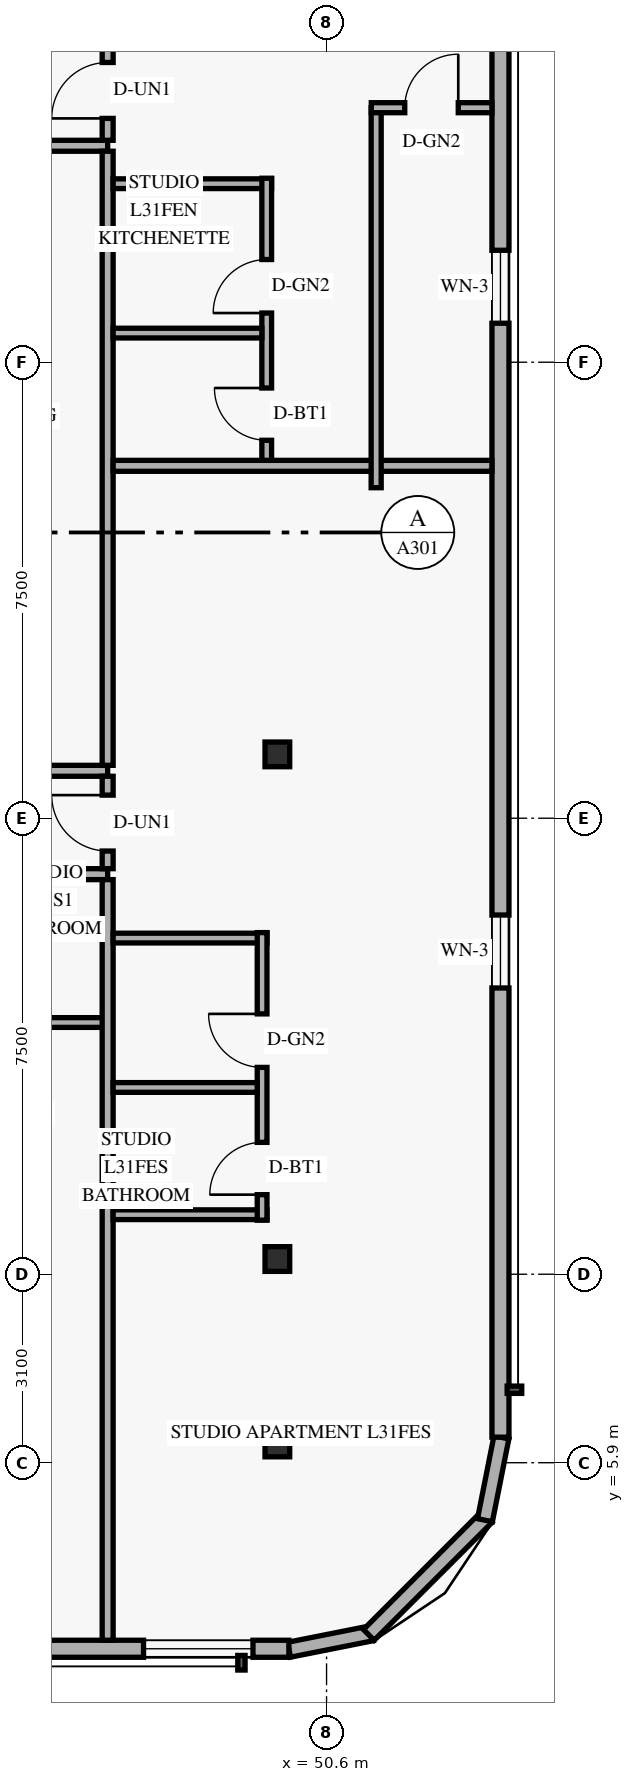
"""IFC4 building model, lengths in metres.
Left out: names, types, materials, properties, quantities, classifications, styles, units other than length and angle.
Written with IfcOpenShell. Run it as: python <this file> out.ifc"""

import sys

from ifc_helpers import new_model, si_unit, direction, frame, frame_2d, origin, origin_2d, place, context, subcontext, project, spatial, rectangle, hollow_rectangle, extrude, element, fill, save


model = new_model("IFC4")
c1 = context("Model", 3, precision=1e-05, world=origin(), true_north=direction((0.0, 1.0)))
c2 = subcontext(c1, "Body", "Model", "MODEL_VIEW")
j1 = project(units=[si_unit("LENGTHUNIT", "METRE"), si_unit("PLANEANGLEUNIT", "RADIAN")], contexts=[c1])
p1 = place(None, origin())
s1 = spatial("IfcSite", under=j1, at=p1, CompositionType="ELEMENT")
p2 = place(p1, origin())
s2 = spatial("IfcBuilding", under=s1, at=p2, CompositionType="ELEMENT")
p3 = place(p2, frame((0.0, 0.0, 121.2)))
s3 = spatial("IfcBuildingStorey", under=s2, at=p3, CompositionType="ELEMENT", Elevation=121.2)
for number, where, z_axis, x_axis in (
    (1, (49.686, 6.2, 0.0), (0.058, 0.0, 0.998), (0.0, 1.0, 0.0)),
    (2, (49.686, 9.25, 0.0), (0.058, 0.0, 0.998), (0.0, 1.0, 0.0)),
    (3, (49.686, 17.55, 0.0), (0.058, 0.0, 0.998), (0.0, 1.0, 0.0)),
):
    element("IfcColumn", number, at=place(p3, frame(where, z_axis=z_axis, x_axis=x_axis)), inside=s3, PredefinedType="COLUMN", context=c2, shape_type="SweptSolid", body=[
        extrude(hollow_rectangle(XDim=0.406, YDim=0.406, WallThickness=0.016, at=origin_2d()), origin(), (0.0, 0.0, 1.0), 3.606),
    ])
p4 = place(p3, frame((49.983, 2.824, 0.0), z_axis=(0.0, 0.0, 1.0), x_axis=(0.980809899341, 0.19496651342, 0.0)))
e4 = element("IfcWall", 4, at=p4, inside=s3, PredefinedType="SOLIDWALL", context=c2, shape_type="SweptSolid", body=[
    extrude(rectangle(XDim=1.389, YDim=0.25, at=frame_2d((0.694, 0.0))), origin(), (0.0, 0.0, 1.0), 3.36),
])
p5 = place(p3, frame((51.295, 3.068, 0.0), z_axis=(0.0, 0.0, 1.0), x_axis=(0.707151344399, 0.707062215165, 0.0)))
e5 = element("IfcWall", 5, at=p5, inside=s3, PredefinedType="SOLIDWALL", context=c2, shape_type="SweptSolid", body=[
    extrude(rectangle(XDim=2.739, YDim=0.25, at=frame_2d((1.37, 0.0))), origin(), (0.0, 0.0, 1.0), 3.36),
])
p6 = place(p3, frame((53.205, 4.955, 0.0), z_axis=(0.0, 0.0, 1.0), x_axis=(0.195000137217, 0.980803214965, 0.0)))
e6 = element("IfcWall", 6, at=p6, inside=s3, PredefinedType="SOLIDWALL", context=c2, shape_type="SweptSolid", body=[
    extrude(rectangle(XDim=1.388, YDim=0.25, at=frame_2d((0.694, 0.0))), origin(), (0.0, 0.0, 1.0), 3.36),
])
p7 = place(p3, frame((13.42, 2.84, 0.0), z_axis=(0.0, 0.0, 1.0), x_axis=(1.0, 0.0, 0.0)))
e7 = element("IfcWall", 7, at=p7, inside=s3, PredefinedType="SOLIDWALL", context=c2, shape_type="SweptSolid", body=[
    extrude(rectangle(XDim=36.56, YDim=0.28, at=frame_2d((18.28, 0.0))), origin(), (0.0, 0.0, 1.0), 3.36),
])
p8 = place(p7, frame((3.215, 0.0, 0.85)))
e8 = element("IfcOpeningElement", 8, at=p8, cuts=e7, PredefinedType="OPENING", context=c2, shape_type="SweptSolid", body=[
    extrude(rectangle(XDim=1.8, YDim=1.6, at=frame_2d((0.9, 0.8))), frame((0.0, 0.15, 0.0), z_axis=(0.0, -1.0, 0.0), x_axis=(1.0, 0.0, 0.0)), (0.0, 0.0, 1.0), 0.3),
])
p9 = place(p7, frame((10.405, 0.0, 0.85)))
e9 = element("IfcOpeningElement", 9, at=p9, cuts=e7, PredefinedType="OPENING", context=c2, shape_type="SweptSolid", body=[
    extrude(rectangle(XDim=1.8, YDim=1.6, at=frame_2d((0.9, 0.8))), frame((0.0, 0.15, 0.0), z_axis=(0.0, -1.0, 0.0), x_axis=(1.0, 0.0, 0.0)), (0.0, 0.0, 1.0), 0.3),
])
p10 = place(p7, frame((17.29, 0.0, 0.85)))
e10 = element("IfcOpeningElement", 10, at=p10, cuts=e7, PredefinedType="OPENING", context=c2, shape_type="SweptSolid", body=[
    extrude(rectangle(XDim=1.8, YDim=1.6, at=frame_2d((0.9, 0.8))), frame((0.0, 0.15, 0.0), z_axis=(0.0, -1.0, 0.0), x_axis=(1.0, 0.0, 0.0)), (0.0, 0.0, 1.0), 0.3),
])
p11 = place(p7, frame((22.565, 0.0, 0.85)))
e11 = element("IfcOpeningElement", 11, at=p11, cuts=e7, PredefinedType="OPENING", context=c2, shape_type="SweptSolid", body=[
    extrude(rectangle(XDim=1.8, YDim=1.6, at=frame_2d((0.9, 0.8))), frame((0.0, 0.15, 0.0), z_axis=(0.0, -1.0, 0.0), x_axis=(1.0, 0.0, 0.0)), (0.0, 0.0, 1.0), 0.3),
])
p12 = place(p7, frame((28.355, 0.0, 0.85)))
e12 = element("IfcOpeningElement", 12, at=p12, cuts=e7, PredefinedType="OPENING", context=c2, shape_type="SweptSolid", body=[
    extrude(rectangle(XDim=1.8, YDim=1.6, at=frame_2d((0.9, 0.8))), frame((0.0, 0.15, 0.0), z_axis=(0.0, -1.0, 0.0), x_axis=(1.0, 0.0, 0.0)), (0.0, 0.0, 1.0), 0.3),
])
p13 = place(p7, frame((34.17, 0.0, 0.85)))
e13 = element("IfcOpeningElement", 13, at=p13, cuts=e7, PredefinedType="OPENING", context=c2, shape_type="SweptSolid", body=[
    extrude(rectangle(XDim=1.8, YDim=1.6, at=frame_2d((0.9, 0.8))), frame((0.0, 0.15, 0.0), z_axis=(0.0, -1.0, 0.0), x_axis=(1.0, 0.0, 0.0)), (0.0, 0.0, 1.0), 0.3),
])
p14 = place(p3, frame((53.46, 6.32, 0.0), z_axis=(0.0, 0.0, 1.0), x_axis=(0.0, 1.0, 0.0)))
e14 = element("IfcWall", 14, at=p14, inside=s3, PredefinedType="SOLIDWALL", context=c2, shape_type="SweptSolid", body=[
    extrude(rectangle(XDim=35.36, YDim=0.28, at=frame_2d((17.68, 0.0))), origin(), (0.0, 0.0, 1.0), 3.36),
])
p15 = place(p14, frame((7.388, 0.0, 0.85)))
e15 = element("IfcOpeningElement", 15, at=p15, cuts=e14, PredefinedType="OPENING", context=c2, shape_type="SweptSolid", body=[
    extrude(rectangle(XDim=1.2, YDim=1.5, at=frame_2d((0.6, 0.75))), frame((0.0, 0.15, 0.0), z_axis=(0.0, -1.0, 0.0), x_axis=(1.0, 0.0, 0.0)), (0.0, 0.0, 1.0), 0.3),
])
p16 = place(p14, frame((18.321, 0.0, 0.85)))
e16 = element("IfcOpeningElement", 16, at=p16, cuts=e14, PredefinedType="OPENING", context=c2, shape_type="SweptSolid", body=[
    extrude(rectangle(XDim=1.2, YDim=1.5, at=frame_2d((0.6, 0.75))), frame((0.0, 0.15, 0.0), z_axis=(0.0, -1.0, 0.0), x_axis=(1.0, 0.0, 0.0)), (0.0, 0.0, 1.0), 0.3),
])
p17 = place(p14, frame((28.013, 0.0, 0.85)))
e17 = element("IfcOpeningElement", 17, at=p17, cuts=e14, PredefinedType="OPENING", context=c2, shape_type="SweptSolid", body=[
    extrude(rectangle(XDim=1.2, YDim=1.5, at=frame_2d((0.6, 0.75))), frame((0.0, 0.15, 0.0), z_axis=(0.0, -1.0, 0.0), x_axis=(1.0, 0.0, 0.0)), (0.0, 0.0, 1.0), 0.3),
])
p18 = place(p3, frame((38.433, 15.58, 0.0), z_axis=(0.0, 0.0, 1.0), x_axis=(1.0, 0.0, 0.0)))
e18 = element("IfcWall", 18, at=p18, inside=s3, PredefinedType="STANDARD", context=c2, shape_type="SweptSolid", body=[
    extrude(rectangle(XDim=8.567, YDim=0.18, at=frame_2d((4.284, 0.0))), origin(), (0.0, 0.0, 1.0), 2.731),
])
p19 = place(p18, frame((0.357, 0.0, 0.0)))
e19 = element("IfcOpeningElement", 19, at=p19, cuts=e18, PredefinedType="OPENING", context=c2, shape_type="SweptSolid", body=[
    extrude(rectangle(XDim=0.92, YDim=2.15, at=frame_2d((0.46, 1.075))), frame((0.0, 0.1, 0.0), z_axis=(0.0, -1.0, 0.0), x_axis=(1.0, 0.0, 0.0)), (0.0, 0.0, 1.0), 0.2),
])
p20 = place(p3, frame((37.64, 17.28, 0.0), z_axis=(0.0, 0.0, 1.0), x_axis=(1.0, 0.0, 0.0)))
e20 = element("IfcWall", 20, at=p20, inside=s3, PredefinedType="STANDARD", context=c2, shape_type="SweptSolid", body=[
    extrude(rectangle(XDim=9.36, YDim=0.18, at=frame_2d((4.68, 0.0))), origin(), (0.0, 0.0, 1.0), 2.731),
])
p21 = place(p20, frame((7.238, 0.0, 0.0)))
e21 = element("IfcOpeningElement", 21, at=p21, cuts=e20, PredefinedType="OPENING", context=c2, shape_type="SweptSolid", body=[
    extrude(rectangle(XDim=0.92, YDim=2.15, at=frame_2d((0.46, 1.075))), frame((0.0, 0.1, 0.0), z_axis=(0.0, -1.0, 0.0), x_axis=(1.0, 0.0, 0.0)), (0.0, 0.0, 1.0), 0.2),
])
p22 = place(p3, frame((37.64, 27.56, 0.0), z_axis=(0.0, 0.0, 1.0), x_axis=(1.0, 0.0, 0.0)))
e22 = element("IfcWall", 22, at=p22, inside=s3, PredefinedType="STANDARD", context=c2, shape_type="SweptSolid", body=[
    extrude(rectangle(XDim=9.36, YDim=0.18, at=frame_2d((4.68, 0.0))), origin(), (0.0, 0.0, 1.0), 2.731),
])
p23 = place(p3, frame((42.33, 13.14, 0.0), z_axis=(0.0, 0.0, 1.0), x_axis=(1.0, 0.0, 0.0)))
e23 = element("IfcWall", 23, at=p23, inside=s3, PredefinedType="PLUMBINGWALL", context=c2, shape_type="SweptSolid", body=[
    extrude(rectangle(XDim=4.67, YDim=0.16, at=frame_2d((2.335, 0.0))), origin(), (0.0, 0.0, 1.0), 2.731),
])
p24 = place(p23, frame((0.35, 0.0, 0.0)))
e24 = element("IfcOpeningElement", 24, at=p24, cuts=e23, PredefinedType="OPENING", context=c2, shape_type="SweptSolid", body=[
    extrude(rectangle(XDim=0.88, YDim=2.12, at=frame_2d((0.44, 1.06))), frame((0.0, 0.09, 0.0), z_axis=(0.0, -1.0, 0.0), x_axis=(1.0, 0.0, 0.0)), (0.0, 0.0, 1.0), 0.18),
])
p25 = place(p23, frame((2.72, 0.0, 0.0)))
e25 = element("IfcOpeningElement", 25, at=p25, cuts=e23, PredefinedType="OPENING", context=c2, shape_type="SweptSolid", body=[
    extrude(rectangle(XDim=0.86, YDim=2.12, at=frame_2d((0.43, 1.06))), frame((0.0, 0.09, 0.0), z_axis=(0.0, -1.0, 0.0), x_axis=(1.0, 0.0, 0.0)), (0.0, 0.0, 1.0), 0.18),
])
p26 = place(p3, frame((47.0, 15.67, 0.0), z_axis=(0.0, 0.0, 1.0), x_axis=(0.0, 1.0, 0.0)))
e26 = element("IfcWall", 26, at=p26, inside=s3, PredefinedType="STANDARD", context=c2, shape_type="SweptSolid", body=[
    extrude(rectangle(XDim=1.52, YDim=0.18, at=frame_2d((0.76, 0.0))), origin(), (0.0, 0.0, 1.0), 3.36),
])
p27 = place(p26, frame((0.29, 0.0, 0.0)))
e27 = element("IfcOpeningElement", 27, at=p27, cuts=e26, PredefinedType="OPENING", context=c2, shape_type="SweptSolid", body=[
    extrude(rectangle(XDim=0.92, YDim=2.15, at=frame_2d((0.46, 1.075))), frame((0.0, 0.1, 0.0), z_axis=(0.0, -1.0, 0.0), x_axis=(1.0, 0.0, 0.0)), (0.0, 0.0, 1.0), 0.2),
])
p28 = place(p3, frame((47.0, 27.65, 0.0), z_axis=(0.0, 0.0, 1.0), x_axis=(0.0, 1.0, 0.0)))
e28 = element("IfcWall", 28, at=p28, inside=s3, PredefinedType="STANDARD", context=c2, shape_type="SweptSolid", body=[
    extrude(rectangle(XDim=1.72, YDim=0.18, at=frame_2d((0.86, 0.0))), origin(), (0.0, 0.0, 1.0), 3.36),
])
p29 = place(p28, frame((0.36, 0.0, 0.0)))
e29 = element("IfcOpeningElement", 29, at=p29, cuts=e28, PredefinedType="OPENING", context=c2, shape_type="SweptSolid", body=[
    extrude(rectangle(XDim=0.92, YDim=2.15, at=frame_2d((0.46, 1.075))), frame((0.0, 0.1, 0.0), z_axis=(0.0, -1.0, 0.0), x_axis=(1.0, 0.0, 0.0)), (0.0, 0.0, 1.0), 0.2),
])
p30 = place(p3, frame((47.0, 2.98, 0.0), z_axis=(0.0, 0.0, 1.0), x_axis=(0.0, 1.0, 0.0)))
e30 = element("IfcWall", 30, at=p30, inside=s3, PredefinedType="PARTITIONING", context=c2, shape_type="SweptSolid", body=[
    extrude(rectangle(XDim=12.51, YDim=0.18, at=frame_2d((6.255, 0.0))), origin(), (0.0, 0.0, 1.0), 2.731),
])
p31 = place(p3, frame((47.0, 17.37, 0.0), z_axis=(0.0, 0.0, 1.0), x_axis=(0.0, 1.0, 0.0)))
e31 = element("IfcWall", 31, at=p31, inside=s3, PredefinedType="PARTITIONING", context=c2, shape_type="SweptSolid", body=[
    extrude(rectangle(XDim=10.1, YDim=0.18, at=frame_2d((5.05, 0.0))), origin(), (0.0, 0.0, 1.0), 2.731),
])
p32 = place(p3, frame((47.09, 22.296, 0.0), z_axis=(0.0, 0.0, 1.0), x_axis=(1.0, 0.0, 0.0)))
e32 = element("IfcWall", 32, at=p32, inside=s3, PredefinedType="PARTITIONING", context=c2, shape_type="SweptSolid", body=[
    extrude(rectangle(XDim=6.23, YDim=0.18, at=frame_2d((3.115, 0.0))), origin(), (0.0, 0.0, 1.0), 2.809),
])
for number, where, z_axis, x_axis in (
    (33, (47.09, 9.979, 0.0), (0.0, 0.0, 1.0), (1.0, 0.0, 0.0)),
    (34, (47.09, 14.529, 0.0), (0.0, 0.0, 1.0), (1.0, 0.0, 0.0)),
):
    element("IfcWall", number, at=place(p3, frame(where, z_axis=z_axis, x_axis=x_axis)), inside=s3, PredefinedType="PLUMBINGWALL", context=c2, shape_type="SweptSolid", body=[
        extrude(rectangle(XDim=2.53, YDim=0.16, at=frame_2d((1.265, 0.0))), origin(), (0.0, 0.0, 1.0), 3.36),
    ])
p33 = place(p3, frame((49.54, 9.889, 0.0), z_axis=(0.0, 0.0, 1.0), x_axis=(0.0, 1.0, 0.0)))
e35 = element("IfcWall", 35, at=p33, inside=s3, PredefinedType="PLUMBINGWALL", context=c2, shape_type="SweptSolid", body=[
    extrude(rectangle(XDim=4.73, YDim=0.16, at=frame_2d((2.365, 0.0))), origin(), (0.0, 0.0, 1.0), 2.988),
])
p34 = place(p33, frame((0.42, 0.0, 0.0)))
e36 = element("IfcOpeningElement", 36, at=p34, cuts=e35, PredefinedType="OPENING", context=c2, shape_type="SweptSolid", body=[
    extrude(rectangle(XDim=0.86, YDim=2.12, at=frame_2d((0.43, 1.06))), frame((0.0, 0.09, 0.0), z_axis=(0.0, -1.0, 0.0), x_axis=(1.0, 0.0, 0.0)), (0.0, 0.0, 1.0), 0.18),
])
p35 = place(p33, frame((2.513, 0.0, 0.0)))
e37 = element("IfcOpeningElement", 37, at=p35, cuts=e35, PredefinedType="OPENING", context=c2, shape_type="SweptSolid", body=[
    extrude(rectangle(XDim=0.88, YDim=2.12, at=frame_2d((0.44, 1.06))), frame((0.0, 0.09, 0.0), z_axis=(0.0, -1.0, 0.0), x_axis=(1.0, 0.0, 0.0)), (0.0, 0.0, 1.0), 0.18),
])
p36 = place(p3, frame((47.09, 12.072, 0.0), z_axis=(0.0, 0.0, 1.0), x_axis=(1.0, 0.0, 0.0)))
e38 = element("IfcWall", 38, at=p36, inside=s3, PredefinedType="PLUMBINGWALL", context=c2, shape_type="SweptSolid", body=[
    extrude(rectangle(XDim=2.37, YDim=0.16, at=frame_2d((1.185, 0.0))), origin(), (0.0, 0.0, 1.0), 3.36),
])
p37 = place(p3, frame((47.09, 26.936, 0.0), z_axis=(0.0, 0.0, 1.0), x_axis=(1.0, 0.0, 0.0)))
e39 = element("IfcWall", 39, at=p37, inside=s3, PredefinedType="PLUMBINGWALL", context=c2, shape_type="SweptSolid", body=[
    extrude(rectangle(XDim=2.606, YDim=0.16, at=frame_2d((1.303, 0.0))), origin(), (0.0, 0.0, 1.0), 3.36),
])
p38 = place(p3, frame((49.616, 22.386, 0.0), z_axis=(0.0, 0.0, 1.0), x_axis=(0.0, 1.0, 0.0)))
e40 = element("IfcWall", 40, at=p38, inside=s3, PredefinedType="PLUMBINGWALL", context=c2, shape_type="SweptSolid", body=[
    extrude(rectangle(XDim=4.64, YDim=0.16, at=frame_2d((2.32, 0.0))), origin(), (0.0, 0.0, 1.0), 3.36),
])
p39 = place(p38, frame((0.33, 0.0, 0.0)))
e41 = element("IfcOpeningElement", 41, at=p39, cuts=e40, PredefinedType="OPENING", context=c2, shape_type="SweptSolid", body=[
    extrude(rectangle(XDim=0.86, YDim=2.12, at=frame_2d((0.43, 1.06))), frame((0.0, 0.09, 0.0), z_axis=(0.0, -1.0, 0.0), x_axis=(1.0, 0.0, 0.0)), (0.0, 0.0, 1.0), 0.18),
])
p40 = place(p38, frame((2.423, 0.0, 0.0)))
e42 = element("IfcOpeningElement", 42, at=p40, cuts=e40, PredefinedType="OPENING", context=c2, shape_type="SweptSolid", body=[
    extrude(rectangle(XDim=0.88, YDim=2.12, at=frame_2d((0.44, 1.06))), frame((0.0, 0.09, 0.0), z_axis=(0.0, -1.0, 0.0), x_axis=(1.0, 0.0, 0.0)), (0.0, 0.0, 1.0), 0.18),
])
p41 = place(p3, frame((47.09, 24.479, 0.0), z_axis=(0.0, 0.0, 1.0), x_axis=(1.0, 0.0, 0.0)))
e43 = element("IfcWall", 43, at=p41, inside=s3, PredefinedType="PLUMBINGWALL", context=c2, shape_type="SweptSolid", body=[
    extrude(rectangle(XDim=2.446, YDim=0.16, at=frame_2d((1.223, 0.0))), origin(), (0.0, 0.0, 1.0), 3.36),
])
p42 = place(p3, frame((51.416, 21.936, 0.0), z_axis=(0.0, 0.0, 1.0), x_axis=(0.0, 1.0, 0.0)))
e44 = element("IfcWall", 44, at=p42, inside=s3, PredefinedType="PARTITIONING", context=c2, shape_type="SweptSolid", body=[
    extrude(rectangle(XDim=6.25, YDim=0.165, at=frame_2d((3.125, 0.0))), origin(), (0.0, 0.0, 1.0), 3.36),
])
p43 = place(p3, frame((51.336, 28.186, 0.0), z_axis=(0.0, 0.0, 1.0), x_axis=(1.0, 0.0, 0.0)))
e45 = element("IfcWall", 45, at=p43, inside=s3, PredefinedType="PARTITIONING", context=c2, shape_type="SweptSolid", body=[
    extrude(rectangle(XDim=1.984, YDim=0.165, at=frame_2d((0.992, 0.0))), origin(), (0.0, 0.0, 1.0), 3.36),
])
p44 = place(p43, frame((0.55, 0.0, 0.0)))
e46 = element("IfcOpeningElement", 46, at=p44, cuts=e45, PredefinedType="OPENING", context=c2, shape_type="SweptSolid", body=[
    extrude(rectangle(XDim=0.88, YDim=2.12, at=frame_2d((0.44, 1.06))), frame((0.0, 0.093, 0.0), z_axis=(0.0, -1.0, 0.0), x_axis=(1.0, 0.0, 0.0)), (0.0, 0.0, 1.0), 0.185),
])
p45 = place(p13, origin())
e47 = element("IfcWindow", 47, at=p45, inside=s3, PartitioningType="SINGLE_PANEL", PredefinedType="WINDOW", context=c2, shape_type="SweptSolid", body=[
    extrude(rectangle(XDim=1.8, YDim=1.6, at=frame_2d((0.9, 0.8))), frame((0.0, 0.03, 0.0), z_axis=(0.0, -1.0, 0.0), x_axis=(1.0, 0.0, 0.0)), (0.0, 0.0, 1.0), 0.06),
])
fill(e13, e47)
p46 = place(p15, origin())
e48 = element("IfcWindow", 48, at=p46, inside=s3, PartitioningType="SINGLE_PANEL", PredefinedType="WINDOW", context=c2, shape_type="SweptSolid", body=[
    extrude(rectangle(XDim=1.2, YDim=1.5, at=frame_2d((0.6, 0.75))), frame((0.0, 0.03, 0.0), z_axis=(0.0, -1.0, 0.0), x_axis=(1.0, 0.0, 0.0)), (0.0, 0.0, 1.0), 0.06),
])
fill(e15, e48)
p47 = place(p16, origin())
e49 = element("IfcWindow", 49, at=p47, inside=s3, PartitioningType="SINGLE_PANEL", PredefinedType="WINDOW", context=c2, shape_type="SweptSolid", body=[
    extrude(rectangle(XDim=1.2, YDim=1.5, at=frame_2d((0.6, 0.75))), frame((0.0, 0.03, 0.0), z_axis=(0.0, -1.0, 0.0), x_axis=(1.0, 0.0, 0.0)), (0.0, 0.0, 1.0), 0.06),
])
fill(e16, e49)
p48 = place(p27, origin())
e50 = element("IfcDoor", 50, at=p48, inside=s3, OperationType="SINGLE_SWING_RIGHT", PredefinedType="DOOR", context=c2, shape_type="SweptSolid", body=[
    extrude(rectangle(XDim=0.92, YDim=2.15, at=frame_2d((0.46, 1.075))), frame((0.0, 0.025, 0.0), z_axis=(0.0, -1.0, 0.0), x_axis=(1.0, 0.0, 0.0)), (0.0, 0.0, 1.0), 0.05),
])
fill(e27, e50)
p49 = place(p34, origin())
e51 = element("IfcDoor", 51, at=p49, inside=s3, OperationType="SINGLE_SWING_LEFT", PredefinedType="DOOR", context=c2, shape_type="SweptSolid", body=[
    extrude(rectangle(XDim=0.86, YDim=2.12, at=frame_2d((0.43, 1.06))), frame((0.0, 0.025, 0.0), z_axis=(0.0, -1.0, 0.0), x_axis=(1.0, 0.0, 0.0)), (0.0, 0.0, 1.0), 0.05),
])
fill(e36, e51)
p50 = place(p35, origin())
e52 = element("IfcDoor", 52, at=p50, inside=s3, OperationType="SINGLE_SWING_RIGHT", PredefinedType="DOOR", context=c2, shape_type="SweptSolid", body=[
    extrude(rectangle(XDim=0.88, YDim=2.12, at=frame_2d((0.44, 1.06))), frame((0.0, 0.025, 0.0), z_axis=(0.0, -1.0, 0.0), x_axis=(1.0, 0.0, 0.0)), (0.0, 0.0, 1.0), 0.05),
])
fill(e37, e52)
p51 = place(p44, origin())
e53 = element("IfcDoor", 53, at=p51, inside=s3, OperationType="SINGLE_SWING_RIGHT", PredefinedType="DOOR", context=c2, shape_type="SweptSolid", body=[
    extrude(rectangle(XDim=0.88, YDim=2.12, at=frame_2d((0.44, 1.06))), frame((0.0, 0.025, 0.0), z_axis=(0.0, -1.0, 0.0), x_axis=(1.0, 0.0, 0.0)), (0.0, 0.0, 1.0), 0.05),
])
fill(e46, e53)
p52 = place(p29, origin())
e54 = element("IfcDoor", 54, at=p52, inside=s3, OperationType="SINGLE_SWING_LEFT", PredefinedType="DOOR", context=c2, shape_type="SweptSolid", body=[
    extrude(rectangle(XDim=0.92, YDim=2.15, at=frame_2d((0.46, 1.075))), frame((0.0, 0.025, 0.0), z_axis=(0.0, -1.0, 0.0), x_axis=(1.0, 0.0, 0.0)), (0.0, 0.0, 1.0), 0.05),
])
fill(e29, e54)
p53 = place(p39, origin())
e55 = element("IfcDoor", 55, at=p53, inside=s3, OperationType="SINGLE_SWING_RIGHT", PredefinedType="DOOR", context=c2, shape_type="SweptSolid", body=[
    extrude(rectangle(XDim=0.86, YDim=2.12, at=frame_2d((0.43, 1.06))), frame((0.0, 0.025, 0.0), z_axis=(0.0, -1.0, 0.0), x_axis=(1.0, 0.0, 0.0)), (0.0, 0.0, 1.0), 0.05),
])
fill(e41, e55)
p54 = place(p40, origin())
e56 = element("IfcDoor", 56, at=p54, inside=s3, OperationType="SINGLE_SWING_LEFT", PredefinedType="DOOR", context=c2, shape_type="SweptSolid", body=[
    extrude(rectangle(XDim=0.88, YDim=2.12, at=frame_2d((0.44, 1.06))), frame((0.0, 0.025, 0.0), z_axis=(0.0, -1.0, 0.0), x_axis=(1.0, 0.0, 0.0)), (0.0, 0.0, 1.0), 0.05),
])
fill(e42, e56)
save(model, sys.argv[1])
